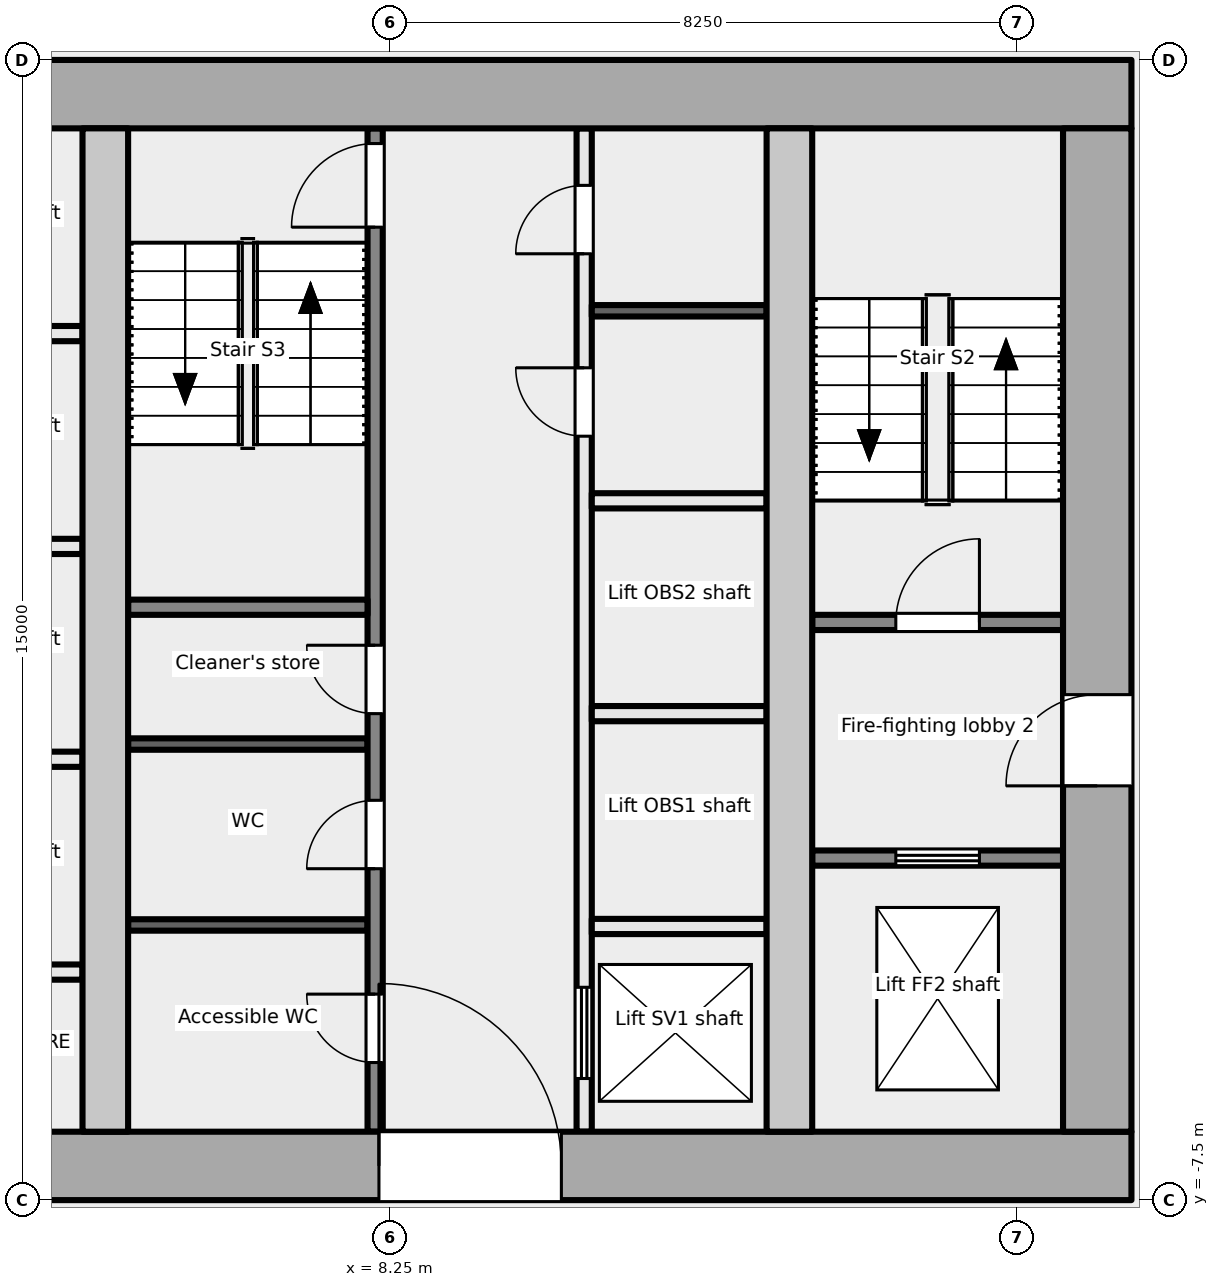
"""IFC4 building model, lengths in metres.
Left out: names, types, materials, properties, quantities, classifications, styles, units other than length and angle.
Written with IfcOpenShell. Run it as: python <this file> out.ifc"""

import sys

from ifc_helpers import new_model, si_unit, direction, frame, frame_2d, origin, place, context, subcontext, project, spatial, rectangle, extrude, element, fill, save


model = new_model("IFC4")
c1 = context("Model", 3, precision=1e-05, world=origin(), true_north=direction((0.0, 1.0)))
c2 = subcontext(c1, "Body", "Model", "MODEL_VIEW")
j1 = project(units=[si_unit("LENGTHUNIT", "METRE"), si_unit("PLANEANGLEUNIT", "RADIAN")], contexts=[c1])
p1 = place(None, origin())
s1 = spatial("IfcSite", under=j1, at=p1, CompositionType="ELEMENT")
p2 = place(p1, origin())
s2 = spatial("IfcBuilding", under=s1, at=p2, CompositionType="ELEMENT")
p3 = place(p2, frame((0.0, 0.0, 27.0)))
s3 = spatial("IfcBuildingStorey", under=s2, at=p3, CompositionType="ELEMENT", Elevation=27.0)
p4 = place(p3, frame((-18.0, -7.05, -0.2), z_axis=(0.0, 0.0, 1.0), x_axis=(1.0, 0.0, 0.0)))
e1 = element("IfcWall", 1, at=p4, inside=s3, PredefinedType="SHEAR", context=c2, shape_type="SweptSolid", body=[
    extrude(rectangle(XDim=36.0, YDim=0.9, at=frame_2d((18.0, 0.0))), origin(), (0.0, 0.0, 1.0), 5.4),
])
p5 = place(p4, frame((7.8, 0.0, 0.2)))
e2 = element("IfcOpeningElement", 2, at=p5, cuts=e1, PredefinedType="OPENING", context=c2, shape_type="SweptSolid", body=[
    extrude(rectangle(XDim=2.4, YDim=2.1, at=frame_2d((1.2, 1.05))), frame((0.0, 0.46, 0.0), z_axis=(0.0, -1.0, 0.0), x_axis=(1.0, 0.0, 0.0)), (0.0, 0.0, 1.0), 0.921),
])
p6 = place(p4, frame((17.4, 0.0, 0.2)))
e3 = element("IfcOpeningElement", 3, at=p6, cuts=e1, PredefinedType="OPENING", context=c2, shape_type="SweptSolid", body=[
    extrude(rectangle(XDim=1.2, YDim=2.1, at=frame_2d((0.6, 1.05))), frame((0.0, 0.46, 0.0), z_axis=(0.0, -1.0, 0.0), x_axis=(1.0, 0.0, 0.0)), (0.0, 0.0, 1.0), 0.921),
])
p7 = place(p4, frame((26.1, 0.0, 0.2)))
e4 = element("IfcOpeningElement", 4, at=p7, cuts=e1, PredefinedType="OPENING", context=c2, shape_type="SweptSolid", body=[
    extrude(rectangle(XDim=2.4, YDim=2.1, at=frame_2d((1.2, 1.05))), frame((0.0, 0.46, 0.0), z_axis=(0.0, -1.0, 0.0), x_axis=(1.0, 0.0, 0.0)), (0.0, 0.0, 1.0), 0.921),
])
p8 = place(p3, frame((-18.0, 7.05, -0.2), z_axis=(0.0, 0.0, 1.0), x_axis=(1.0, 0.0, 0.0)))
e5 = element("IfcWall", 5, at=p8, inside=s3, PredefinedType="SHEAR", context=c2, shape_type="SweptSolid", body=[
    extrude(rectangle(XDim=36.0, YDim=0.9, at=frame_2d((18.0, 0.0))), origin(), (0.0, 0.0, 1.0), 5.4),
])
p9 = place(p3, frame((17.55, -6.6, -0.2), z_axis=(0.0, 0.0, 1.0), x_axis=(0.0, 1.0, 0.0)))
e6 = element("IfcWall", 6, at=p9, inside=s3, PredefinedType="SHEAR", context=c2, shape_type="SweptSolid", body=[
    extrude(rectangle(XDim=13.2, YDim=0.9, at=frame_2d((6.6, 0.0))), origin(), (0.0, 0.0, 1.0), 5.4),
])
p10 = place(p9, frame((4.55, 0.0, 0.2)))
e7 = element("IfcOpeningElement", 7, at=p10, cuts=e6, PredefinedType="OPENING", context=c2, shape_type="SweptSolid", body=[
    extrude(rectangle(XDim=1.2, YDim=2.1, at=frame_2d((0.6, 1.05))), frame((0.0, 0.46, 0.0), z_axis=(0.0, -1.0, 0.0), x_axis=(1.0, 0.0, 0.0)), (0.0, 0.0, 1.0), 0.921),
])
for number, where, z_axis, x_axis in (
    (8, (4.5, -6.6, -0.2), (0.0, 0.0, 1.0), (0.0, 1.0, 0.0)),
    (9, (13.5, -6.6, -0.2), (0.0, 0.0, 1.0), (0.0, 1.0, 0.0)),
):
    element("IfcWall", number, at=place(p3, frame(where, z_axis=z_axis, x_axis=x_axis)), inside=s3, PredefinedType="SHEAR", context=c2, shape_type="SweptSolid", body=[
        extrude(rectangle(XDim=13.2, YDim=0.6, at=frame_2d((6.6, 0.0))), origin(), (0.0, 0.0, 1.0), 5.4),
    ])
p11 = place(p3, frame((13.8, -3.0, 0.0), z_axis=(0.0, 0.0, 1.0), x_axis=(1.0, 0.0, 0.0)))
e10 = element("IfcWall", 10, at=p11, inside=s3, PredefinedType="PARTITIONING", context=c2, shape_type="SweptSolid", body=[
    extrude(rectangle(XDim=3.3, YDim=0.2, at=frame_2d((1.65, 0.0))), origin(), (0.0, 0.0, 1.0), 5.2),
])
p12 = place(p11, frame((1.1, 0.0, 0.0)))
e11 = element("IfcOpeningElement", 11, at=p12, cuts=e10, PredefinedType="OPENING", context=c2, shape_type="SweptSolid", body=[
    extrude(rectangle(XDim=1.1, YDim=2.1, at=frame_2d((0.55, 1.05))), frame((0.0, 0.111, 0.0), z_axis=(0.0, -1.0, 0.0), x_axis=(1.0, 0.0, 0.0)), (0.0, 0.0, 1.0), 0.221),
])
p13 = place(p3, frame((13.8, 0.1, 0.0), z_axis=(0.0, 0.0, 1.0), x_axis=(1.0, 0.0, 0.0)))
e12 = element("IfcWall", 12, at=p13, inside=s3, PredefinedType="PARTITIONING", context=c2, shape_type="SweptSolid", body=[
    extrude(rectangle(XDim=3.3, YDim=0.2, at=frame_2d((1.65, 0.0))), origin(), (0.0, 0.0, 1.0), 5.2),
])
p14 = place(p13, frame((1.1, 0.0, 0.0)))
e13 = element("IfcOpeningElement", 13, at=p14, cuts=e12, PredefinedType="OPENING", context=c2, shape_type="SweptSolid", body=[
    extrude(rectangle(XDim=1.1, YDim=2.1, at=frame_2d((0.55, 1.05))), frame((0.0, 0.111, 0.0), z_axis=(0.0, -1.0, 0.0), x_axis=(1.0, 0.0, 0.0)), (0.0, 0.0, 1.0), 0.221),
])
for number, where, z_axis, x_axis in (
    (14, (1.9, -1.7, 0.0), (0.0, 0.0, 1.0), (1.0, 0.0, 0.0)),
    (15, (1.9, 1.1, 0.0), (0.0, 0.0, 1.0), (1.0, 0.0, 0.0)),
    (16, (1.9, 3.9, 0.0), (0.0, 0.0, 1.0), (1.0, 0.0, 0.0)),
    (17, (1.9, -4.5, 0.0), (0.0, 0.0, 1.0), (1.0, 0.0, 0.0)),
):
    element("IfcWall", number, at=place(p3, frame(where, z_axis=z_axis, x_axis=x_axis)), inside=s3, PredefinedType="PARTITIONING", context=c2, shape_type="SweptSolid", body=[
        extrude(rectangle(XDim=2.3, YDim=0.2, at=frame_2d((1.15, 0.0))), origin(), (0.0, 0.0, 1.0), 5.2),
    ])
p15 = place(p3, frame((8.05, -6.6, 0.0), z_axis=(0.0, 0.0, 1.0), x_axis=(0.0, 1.0, 0.0)))
e18 = element("IfcWall", 18, at=p15, inside=s3, PredefinedType="PARTITIONING", context=c2, shape_type="SweptSolid", body=[
    extrude(rectangle(XDim=13.2, YDim=0.2, at=frame_2d((6.6, 0.0))), origin(), (0.0, 0.0, 1.0), 5.2),
])
p16 = place(p15, frame((0.91, 0.0, 0.0)))
e19 = element("IfcOpeningElement", 19, at=p16, cuts=e18, PredefinedType="OPENING", context=c2, shape_type="SweptSolid", body=[
    extrude(rectangle(XDim=0.9, YDim=2.1, at=frame_2d((0.45, 1.05))), frame((0.0, 0.111, 0.0), z_axis=(0.0, -1.0, 0.0), x_axis=(1.0, 0.0, 0.0)), (0.0, 0.0, 1.0), 0.221),
])
p17 = place(p15, frame((3.46, 0.0, 0.0)))
e20 = element("IfcOpeningElement", 20, at=p17, cuts=e18, PredefinedType="OPENING", context=c2, shape_type="SweptSolid", body=[
    extrude(rectangle(XDim=0.9, YDim=2.1, at=frame_2d((0.45, 1.05))), frame((0.0, 0.111, 0.0), z_axis=(0.0, -1.0, 0.0), x_axis=(1.0, 0.0, 0.0)), (0.0, 0.0, 1.0), 0.221),
])
p18 = place(p15, frame((5.5, 0.0, 0.0)))
e21 = element("IfcOpeningElement", 21, at=p18, cuts=e18, PredefinedType="OPENING", context=c2, shape_type="SweptSolid", body=[
    extrude(rectangle(XDim=0.9, YDim=2.1, at=frame_2d((0.45, 1.05))), frame((0.0, 0.111, 0.0), z_axis=(0.0, -1.0, 0.0), x_axis=(1.0, 0.0, 0.0)), (0.0, 0.0, 1.0), 0.221),
])
p19 = place(p15, frame((11.9, 0.0, 0.0)))
e22 = element("IfcOpeningElement", 22, at=p19, cuts=e18, PredefinedType="OPENING", context=c2, shape_type="SweptSolid", body=[
    extrude(rectangle(XDim=1.1, YDim=2.1, at=frame_2d((0.55, 1.05))), frame((0.0, 0.111, 0.0), z_axis=(0.0, -1.0, 0.0), x_axis=(1.0, 0.0, 0.0)), (0.0, 0.0, 1.0), 0.221),
])
p20 = place(p3, frame((10.8, -6.6, 0.0), z_axis=(0.0, 0.0, 1.0), x_axis=(0.0, 1.0, 0.0)))
e23 = element("IfcWall", 23, at=p20, inside=s3, PredefinedType="PARTITIONING", context=c2, shape_type="SweptSolid", body=[
    extrude(rectangle(XDim=13.2, YDim=0.2, at=frame_2d((6.6, 0.0))), origin(), (0.0, 0.0, 1.0), 5.2),
])
p21 = place(p20, frame((0.7, 0.0, 0.0)))
e24 = element("IfcOpeningElement", 24, at=p21, cuts=e23, PredefinedType="OPENING", context=c2, shape_type="SweptSolid", body=[
    extrude(rectangle(XDim=1.2, YDim=2.1, at=frame_2d((0.6, 1.05))), frame((0.0, 0.111, 0.0), z_axis=(0.0, -1.0, 0.0), x_axis=(1.0, 0.0, 0.0)), (0.0, 0.0, 1.0), 0.221),
])
p22 = place(p20, frame((9.15, 0.0, 0.0)))
e25 = element("IfcOpeningElement", 25, at=p22, cuts=e23, PredefinedType="OPENING", context=c2, shape_type="SweptSolid", body=[
    extrude(rectangle(XDim=0.9, YDim=2.1, at=frame_2d((0.45, 1.05))), frame((0.0, 0.111, 0.0), z_axis=(0.0, -1.0, 0.0), x_axis=(1.0, 0.0, 0.0)), (0.0, 0.0, 1.0), 0.221),
])
p23 = place(p20, frame((11.55, 0.0, 0.0)))
e26 = element("IfcOpeningElement", 26, at=p23, cuts=e23, PredefinedType="OPENING", context=c2, shape_type="SweptSolid", body=[
    extrude(rectangle(XDim=0.9, YDim=2.1, at=frame_2d((0.45, 1.05))), frame((0.0, 0.111, 0.0), z_axis=(0.0, -1.0, 0.0), x_axis=(1.0, 0.0, 0.0)), (0.0, 0.0, 1.0), 0.221),
])
p24 = place(p3, frame((4.8, 0.3, 0.0), z_axis=(0.0, 0.0, 1.0), x_axis=(1.0, 0.0, 0.0)))
e27 = element("IfcWall", 27, at=p24, inside=s3, PredefinedType="PARTITIONING", context=c2, shape_type="SweptSolid", body=[
    extrude(rectangle(XDim=3.15, YDim=0.2, at=frame_2d((1.575, 0.0))), origin(), (0.0, 0.0, 1.0), 5.2),
])
for number, where, z_axis, x_axis in (
    (28, (4.8, -3.88, 0.0), (0.0, 0.0, 1.0), (1.0, 0.0, 0.0)),
    (29, (4.8, -1.5, 0.0), (0.0, 0.0, 1.0), (1.0, 0.0, 0.0)),
):
    element("IfcWall", number, at=place(p3, frame(where, z_axis=z_axis, x_axis=x_axis)), inside=s3, PredefinedType="PARTITIONING", context=c2, shape_type="SweptSolid", body=[
        extrude(rectangle(XDim=3.15, YDim=0.15, at=frame_2d((1.575, 0.0))), origin(), (0.0, 0.0, 1.0), 5.2),
    ])
for number, where, z_axis, x_axis in (
    (30, (10.9, -3.9, 0.0), (0.0, 0.0, 1.0), (1.0, 0.0, 0.0)),
    (31, (10.9, -1.1, 0.0), (0.0, 0.0, 1.0), (1.0, 0.0, 0.0)),
    (32, (10.9, 1.7, 0.0), (0.0, 0.0, 1.0), (1.0, 0.0, 0.0)),
):
    element("IfcWall", number, at=place(p3, frame(where, z_axis=z_axis, x_axis=x_axis)), inside=s3, PredefinedType="PARTITIONING", context=c2, shape_type="SweptSolid", body=[
        extrude(rectangle(XDim=2.3, YDim=0.2, at=frame_2d((1.15, 0.0))), origin(), (0.0, 0.0, 1.0), 5.2),
    ])
p25 = place(p3, frame((10.9, 4.2, 0.0), z_axis=(0.0, 0.0, 1.0), x_axis=(1.0, 0.0, 0.0)))
e33 = element("IfcWall", 33, at=p25, inside=s3, PredefinedType="PARTITIONING", context=c2, shape_type="SweptSolid", body=[
    extrude(rectangle(XDim=2.3, YDim=0.15, at=frame_2d((1.15, 0.0))), origin(), (0.0, 0.0, 1.0), 5.2),
])
p26 = place(p12, origin())
e34 = element("IfcDoor", 34, at=p26, inside=s3, OperationType="DOUBLE_DOOR_SLIDING", PredefinedType="DOOR", context=c2, shape_type="SweptSolid", body=[
    extrude(rectangle(XDim=1.1, YDim=2.1, at=frame_2d((0.55, 1.05))), frame((0.0, 0.025, 0.0), z_axis=(0.0, -1.0, 0.0), x_axis=(1.0, 0.0, 0.0)), (0.0, 0.0, 1.0), 0.05),
])
fill(e11, e34)
p27 = place(p10, origin())
e35 = element("IfcDoor", 35, at=p27, inside=s3, OperationType="SINGLE_SWING_LEFT", PredefinedType="DOOR", context=c2, shape_type="SweptSolid", body=[
    extrude(rectangle(XDim=1.2, YDim=2.1, at=frame_2d((0.6, 1.05))), frame((0.0, 0.025, 0.0), z_axis=(0.0, -1.0, 0.0), x_axis=(1.0, 0.0, 0.0)), (0.0, 0.0, 1.0), 0.05),
])
fill(e7, e35)
p28 = place(p14, origin())
e36 = element("IfcDoor", 36, at=p28, inside=s3, OperationType="SINGLE_SWING_RIGHT", PredefinedType="DOOR", context=c2, shape_type="SweptSolid", body=[
    extrude(rectangle(XDim=1.1, YDim=2.1, at=frame_2d((0.55, 1.05))), frame((0.0, 0.025, 0.0), z_axis=(0.0, -1.0, 0.0), x_axis=(1.0, 0.0, 0.0)), (0.0, 0.0, 1.0), 0.05),
])
fill(e13, e36)
p29 = place(p16, origin())
e37 = element("IfcDoor", 37, at=p29, inside=s3, OperationType="SINGLE_SWING_RIGHT", PredefinedType="DOOR", context=c2, shape_type="SweptSolid", body=[
    extrude(rectangle(XDim=0.9, YDim=2.1, at=frame_2d((0.45, 1.05))), frame((0.0, 0.025, 0.0), z_axis=(0.0, -1.0, 0.0), x_axis=(1.0, 0.0, 0.0)), (0.0, 0.0, 1.0), 0.05),
])
fill(e19, e37)
p30 = place(p17, origin())
e38 = element("IfcDoor", 38, at=p30, inside=s3, OperationType="SINGLE_SWING_LEFT", PredefinedType="DOOR", context=c2, shape_type="SweptSolid", body=[
    extrude(rectangle(XDim=0.9, YDim=2.1, at=frame_2d((0.45, 1.05))), frame((0.0, 0.025, 0.0), z_axis=(0.0, -1.0, 0.0), x_axis=(1.0, 0.0, 0.0)), (0.0, 0.0, 1.0), 0.05),
])
fill(e20, e38)
p31 = place(p18, origin())
e39 = element("IfcDoor", 39, at=p31, inside=s3, OperationType="SINGLE_SWING_RIGHT", PredefinedType="DOOR", context=c2, shape_type="SweptSolid", body=[
    extrude(rectangle(XDim=0.9, YDim=2.1, at=frame_2d((0.45, 1.05))), frame((0.0, 0.025, 0.0), z_axis=(0.0, -1.0, 0.0), x_axis=(1.0, 0.0, 0.0)), (0.0, 0.0, 1.0), 0.05),
])
fill(e21, e39)
p32 = place(p19, origin())
e40 = element("IfcDoor", 40, at=p32, inside=s3, OperationType="SINGLE_SWING_LEFT", PredefinedType="DOOR", context=c2, shape_type="SweptSolid", body=[
    extrude(rectangle(XDim=1.1, YDim=2.1, at=frame_2d((0.55, 1.05))), frame((0.0, 0.025, 0.0), z_axis=(0.0, -1.0, 0.0), x_axis=(1.0, 0.0, 0.0)), (0.0, 0.0, 1.0), 0.05),
])
fill(e22, e40)
p33 = place(p7, origin())
e41 = element("IfcDoor", 41, at=p33, inside=s3, OperationType="DOUBLE_DOOR_DOUBLE_SWING", PredefinedType="DOOR", context=c2, shape_type="SweptSolid", body=[
    extrude(rectangle(XDim=2.4, YDim=2.1, at=frame_2d((1.2, 1.05))), frame((0.0, 0.025, 0.0), z_axis=(0.0, -1.0, 0.0), x_axis=(1.0, 0.0, 0.0)), (0.0, 0.0, 1.0), 0.05),
])
fill(e4, e41)
p34 = place(p21, origin())
e42 = element("IfcDoor", 42, at=p34, inside=s3, OperationType="DOUBLE_DOOR_SLIDING", PredefinedType="DOOR", context=c2, shape_type="SweptSolid", body=[
    extrude(rectangle(XDim=1.2, YDim=2.1, at=frame_2d((0.6, 1.05))), frame((0.0, 0.025, 0.0), z_axis=(0.0, -1.0, 0.0), x_axis=(1.0, 0.0, 0.0)), (0.0, 0.0, 1.0), 0.05),
])
fill(e24, e42)
p35 = place(p22, origin())
e43 = element("IfcDoor", 43, at=p35, inside=s3, OperationType="SINGLE_SWING_RIGHT", PredefinedType="DOOR", context=c2, shape_type="SweptSolid", body=[
    extrude(rectangle(XDim=0.9, YDim=2.1, at=frame_2d((0.45, 1.05))), frame((0.0, 0.025, 0.0), z_axis=(0.0, -1.0, 0.0), x_axis=(1.0, 0.0, 0.0)), (0.0, 0.0, 1.0), 0.05),
])
fill(e25, e43)
p36 = place(p23, origin())
e44 = element("IfcDoor", 44, at=p36, inside=s3, OperationType="SINGLE_SWING_LEFT", PredefinedType="DOOR", context=c2, shape_type="SweptSolid", body=[
    extrude(rectangle(XDim=0.9, YDim=2.1, at=frame_2d((0.45, 1.05))), frame((0.0, 0.025, 0.0), z_axis=(0.0, -1.0, 0.0), x_axis=(1.0, 0.0, 0.0)), (0.0, 0.0, 1.0), 0.05),
])
fill(e26, e44)
save(model, sys.argv[1])
